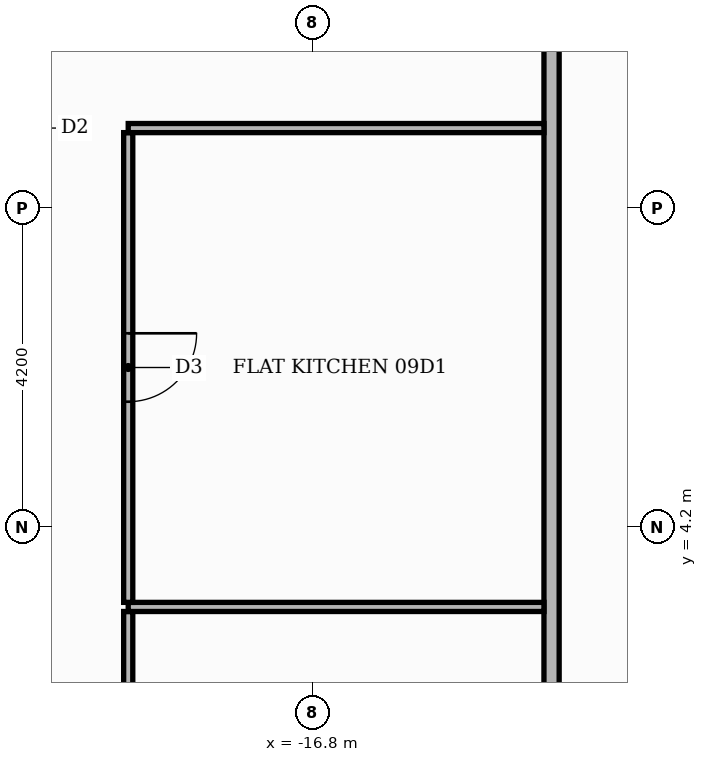
"""IFC4 building model, lengths in metres.
Left out: names, types, materials, properties, quantities, classifications, styles, units other than length and angle.
Written with IfcOpenShell. Run it as: python <this file> out.ifc"""

import sys

from ifc_helpers import new_model, si_unit, direction, frame, frame_2d, origin, place, context, subcontext, project, spatial, rectangle, extrude, element, fill, save


model = new_model("IFC4")
c1 = context("Model", 3, precision=1e-05, world=origin(), true_north=direction((0.0, 1.0)))
c2 = subcontext(c1, "Body", "Model", "MODEL_VIEW")
j1 = project(units=[si_unit("LENGTHUNIT", "METRE"), si_unit("PLANEANGLEUNIT", "RADIAN")], contexts=[c1])
p1 = place(None, origin())
s1 = spatial("IfcSite", under=j1, at=p1, CompositionType="ELEMENT")
p2 = place(p1, origin())
s2 = spatial("IfcBuilding", under=s1, at=p2, CompositionType="ELEMENT")
p3 = place(p2, frame((0.0, 0.0, 42.6)))
s3 = spatial("IfcBuildingStorey", under=s2, at=p3, CompositionType="ELEMENT", Elevation=42.6)
p4 = place(p3, frame((-13.65, -13.55, 0.0), z_axis=(0.0, 0.0, 1.0), x_axis=(0.0, 1.0, 0.0)))
e1 = element("IfcWall", 1, at=p4, inside=s3, PredefinedType="PARTITIONING", context=c2, shape_type="SweptSolid", body=[
    extrude(rectangle(XDim=27.1, YDim=0.2, at=frame_2d((13.55, 0.0))), origin(), (0.0, 0.0, 1.0), 3.48),
])
p5 = place(p4, frame((24.55, 0.0, 0.0)))
e2 = element("IfcOpeningElement", 2, at=p5, cuts=e1, PredefinedType="OPENING", context=c2, shape_type="SweptSolid", body=[
    extrude(rectangle(XDim=1.1, YDim=2.4, at=frame_2d((0.55, 1.2))), frame((0.0, 0.11, 0.0), z_axis=(0.0, -1.0, 0.0), x_axis=(1.0, 0.0, 0.0)), (0.0, 0.0, 1.0), 0.22),
])
p6 = place(p3, frame((-19.22, -1.59, 0.0), z_axis=(0.0, 0.0, 1.0), x_axis=(0.0, 1.0, 0.0)))
e3 = element("IfcWall", 3, at=p6, inside=s3, PredefinedType="PARTITIONING", context=c2, shape_type="SweptSolid", body=[
    extrude(rectangle(XDim=4.68, YDim=0.12, at=frame_2d((2.34, 0.0))), origin(), (0.0, 0.0, 1.0), 3.48),
])
p7 = place(p6, frame((1.89, 0.0, 0.0)))
e4 = element("IfcOpeningElement", 4, at=p7, cuts=e3, PredefinedType="OPENING", context=c2, shape_type="SweptSolid", body=[
    extrude(rectangle(XDim=0.9, YDim=2.1, at=frame_2d((0.45, 1.05))), frame((0.0, 0.07, 0.0), z_axis=(0.0, -1.0, 0.0), x_axis=(1.0, 0.0, 0.0)), (0.0, 0.0, 1.0), 0.14),
])
p8 = place(p3, frame((-19.22, 3.15, 0.0), z_axis=(0.0, 0.0, 1.0), x_axis=(1.0, 0.0, 0.0)))
e5 = element("IfcWall", 5, at=p8, inside=s3, PredefinedType="PARTITIONING", context=c2, shape_type="SweptSolid", body=[
    extrude(rectangle(XDim=5.47, YDim=0.12, at=frame_2d((2.735, 0.0))), origin(), (0.0, 0.0, 1.0), 3.48),
])
p9 = place(p3, frame((-19.22, 3.21, 0.0), z_axis=(0.0, 0.0, 1.0), x_axis=(0.0, 1.0, 0.0)))
e6 = element("IfcWall", 6, at=p9, inside=s3, PredefinedType="PARTITIONING", context=c2, shape_type="SweptSolid", body=[
    extrude(rectangle(XDim=6.18, YDim=0.12, at=frame_2d((3.09, 0.0))), origin(), (0.0, 0.0, 1.0), 3.48),
])
p10 = place(p9, frame((2.64, 0.0, 0.0)))
e7 = element("IfcOpeningElement", 7, at=p10, cuts=e6, PredefinedType="OPENING", context=c2, shape_type="SweptSolid", body=[
    extrude(rectangle(XDim=0.9, YDim=2.1, at=frame_2d((0.45, 1.05))), frame((0.0, 0.07, 0.0), z_axis=(0.0, -1.0, 0.0), x_axis=(1.0, 0.0, 0.0)), (0.0, 0.0, 1.0), 0.14),
])
p11 = place(p3, frame((-19.22, 9.45, 0.0), z_axis=(0.0, 0.0, 1.0), x_axis=(1.0, 0.0, 0.0)))
e8 = element("IfcWall", 8, at=p11, inside=s3, PredefinedType="PARTITIONING", context=c2, shape_type="SweptSolid", body=[
    extrude(rectangle(XDim=5.47, YDim=0.12, at=frame_2d((2.735, 0.0))), origin(), (0.0, 0.0, 1.0), 3.48),
])
p12 = place(p10, frame((0.9, 0.0, 0.0), z_axis=(0.0, 0.0, 1.0), x_axis=(-1.0, 0.0, 0.0)))
e9 = element("IfcDoor", 9, at=p12, inside=s3, OperationType="SINGLE_SWING_RIGHT", PredefinedType="DOOR", context=c2, shape_type="SweptSolid", body=[
    extrude(rectangle(XDim=0.9, YDim=2.1, at=frame_2d((0.45, 1.05))), frame((0.0, 0.025, 0.0), z_axis=(0.0, -1.0, 0.0), x_axis=(1.0, 0.0, 0.0)), (0.0, 0.0, 1.0), 0.05),
])
fill(e7, e9)
save(model, sys.argv[1])
